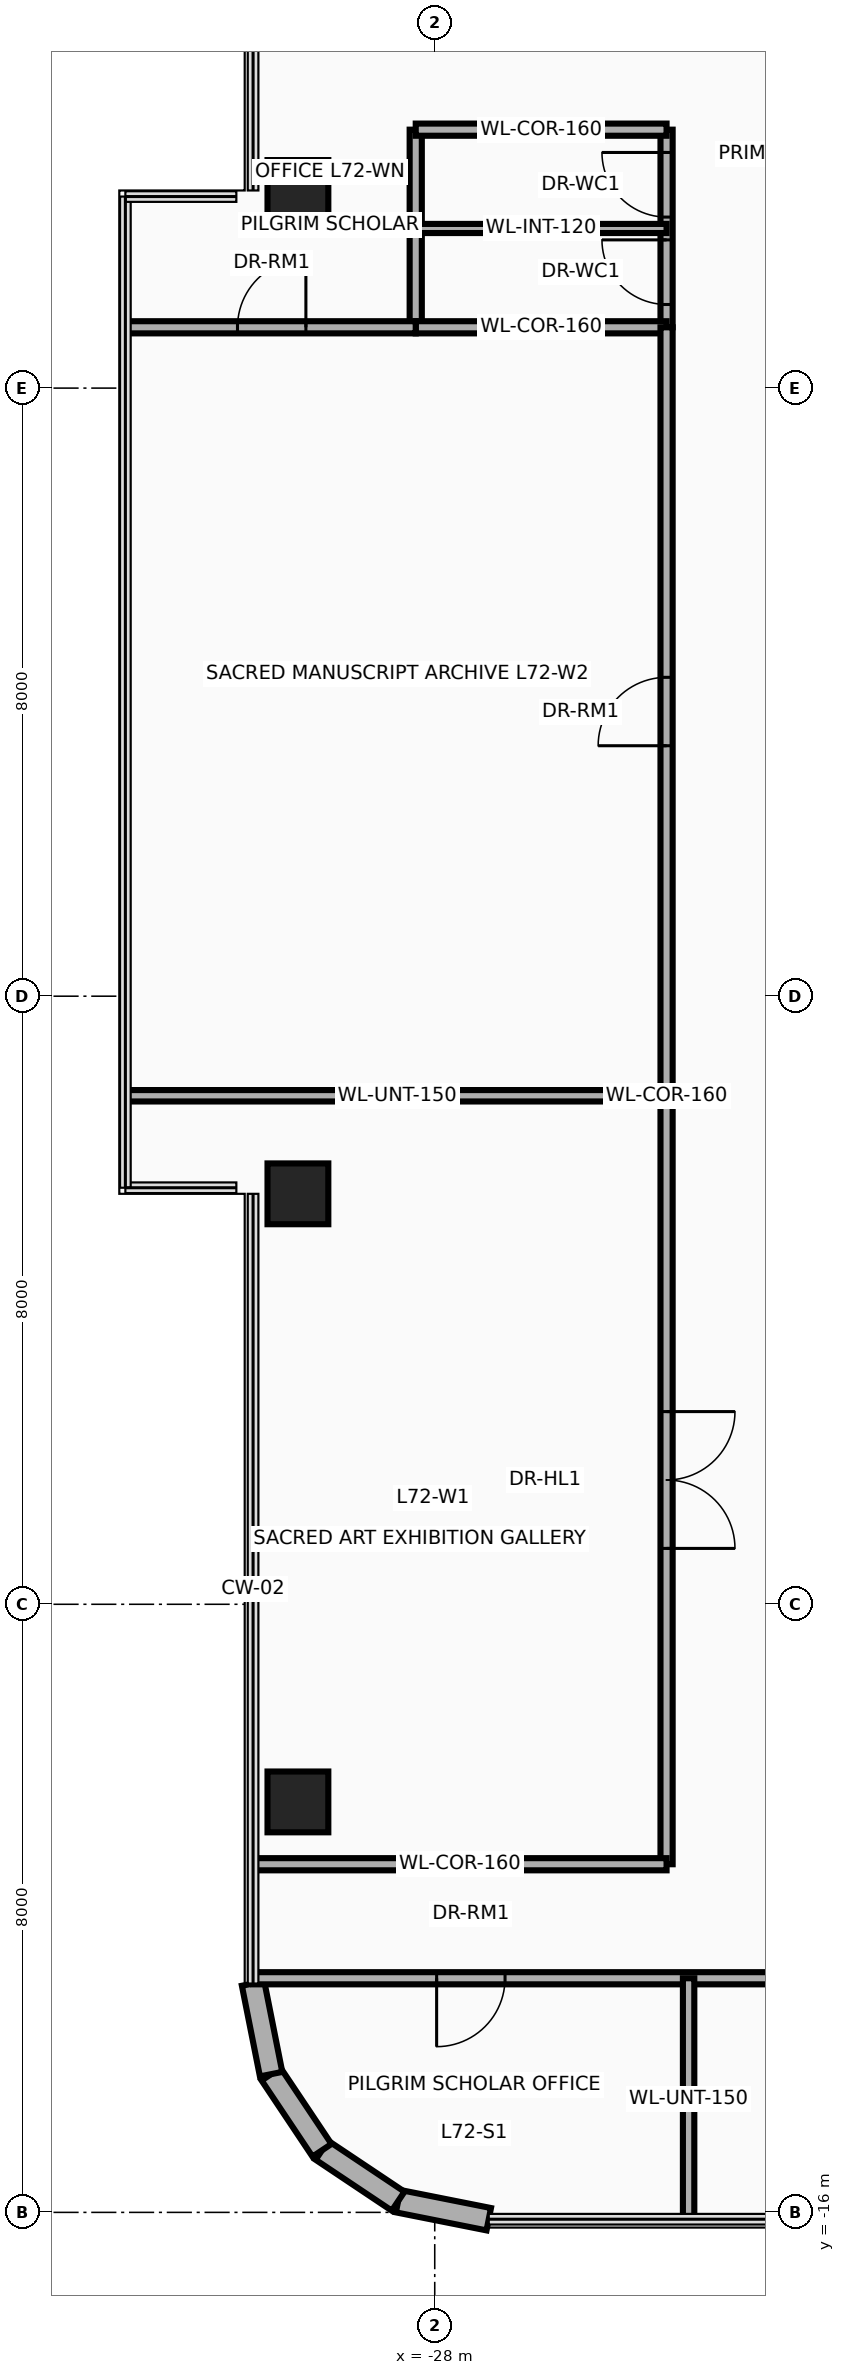
"""IFC4 building model, lengths in metres.
Left out: names, types, materials, properties, quantities, classifications, styles, units other than length and angle.
Written with IfcOpenShell. Run it as: python <this file> out.ifc"""

import sys

from ifc_helpers import new_model, si_unit, direction, frame, frame_2d, origin, origin_2d, place, context, subcontext, project, spatial, rectangle, extrude, source, transform, mapped, element, fill, save


model = new_model("IFC4")
c1 = context("Model", 3, precision=1e-05, world=origin(), true_north=direction((0.0, 1.0)))
c2 = subcontext(c1, "Body", "Model", "MODEL_VIEW")
j1 = project(units=[si_unit("LENGTHUNIT", "METRE"), si_unit("PLANEANGLEUNIT", "RADIAN")], contexts=[c1])
p1 = place(None, origin())
s1 = spatial("IfcSite", under=j1, at=p1, CompositionType="ELEMENT")
p2 = place(p1, origin())
s2 = spatial("IfcBuilding", under=s1, at=p2, CompositionType="ELEMENT")
p3 = place(p2, frame((0.0, 0.0, 276.5)))
s3 = spatial("IfcBuildingStorey", under=s2, at=p3, CompositionType="ELEMENT", Elevation=276.5)
m1 = source(origin(), c2, "Body", "SweptSolid", [
    extrude(rectangle(XDim=0.8, YDim=0.8, at=origin_2d()), origin(), (0.0, 0.0, 1.0), 3.5),
])
for number, where, z_axis, x_axis in (
    (1, (-29.8, -10.6, 0.0), (0.0, 0.0, 1.0), (1.0, 0.0, 0.0)),
    (2, (-29.8, -2.6, 0.0), (0.0, 0.0, 1.0), (1.0, 0.0, 0.0)),
    (3, (-29.8, 10.6, 0.0), (0.0, 0.0, 1.0), (1.0, 0.0, 0.0)),
):
    element("IfcColumn", number, at=place(p3, frame(where, z_axis=z_axis, x_axis=x_axis)), inside=s3, PredefinedType="COLUMN", context=c2, shape_type="MappedRepresentation", body=[
        mapped(m1, transform((0.0, 0.0, 0.0), x_axis=(1.0, 0.0, 0.0), y_axis=(0.0, 1.0, 0.0), z_axis=(0.0, 0.0, 1.0), scale=1.0)),
    ])
p4 = place(p3, frame((-27.289, -16.09, 0.0), z_axis=(0.0, 0.0, 1.0), x_axis=(-0.980765602568, 0.195189223115, 0.0)))
e4 = element("IfcWall", 4, at=p4, inside=s3, PredefinedType="SOLIDWALL", context=c2, shape_type="SweptSolid", body=[
    extrude(rectangle(XDim=1.216, YDim=0.3, at=frame_2d((0.608, 0.0))), origin(), (0.0, 0.0, 1.0), 3.26),
])
for number, where, z_axis, x_axis in (
    (5, (-28.482, -15.853, 0.0), (0.0, 0.0, 1.0), (-0.831, 0.556, 0.0)),
    (6, (-29.483, -15.183, 0.0), (0.0, 0.0, 1.0), (-0.556, 0.831, 0.0)),
):
    element("IfcWall", number, at=place(p3, frame(where, z_axis=z_axis, x_axis=x_axis)), inside=s3, PredefinedType="SOLIDWALL", context=c2, shape_type="SweptSolid", body=[
        extrude(rectangle(XDim=1.205, YDim=0.3, at=frame_2d((0.603, 0.0))), origin(), (0.0, 0.0, 1.0), 3.26),
    ])
p5 = place(p3, frame((-30.153, -14.182, 0.0), z_axis=(0.0, 0.0, 1.0), x_axis=(-0.194996050505, 0.980804027463, 0.0)))
e7 = element("IfcWall", 7, at=p5, inside=s3, PredefinedType="SOLIDWALL", context=c2, shape_type="SweptSolid", body=[
    extrude(rectangle(XDim=1.216, YDim=0.3, at=frame_2d((0.608, 0.0))), origin(), (0.0, 0.0, 1.0), 3.26),
])
p6 = place(p3, frame((-28.25, 8.8, 0.0), z_axis=(0.0, 0.0, 1.0), x_axis=(0.0, 1.0, 0.0)))
e8 = element("IfcWall", 8, at=p6, inside=s3, PredefinedType="PARTITIONING", context=c2, shape_type="SweptSolid", body=[
    extrude(rectangle(XDim=2.6, YDim=0.16, at=frame_2d((1.3, 0.0))), origin(), (0.0, 0.0, 1.0), 2.623),
])
p7 = place(p3, frame((-24.95, 8.8, 0.0), z_axis=(0.0, 0.0, 1.0), x_axis=(0.0, 1.0, 0.0)))
e9 = element("IfcWall", 9, at=p7, inside=s3, PredefinedType="PARTITIONING", context=c2, shape_type="SweptSolid", body=[
    extrude(rectangle(XDim=2.6, YDim=0.16, at=frame_2d((1.3, 0.0))), origin(), (0.0, 0.0, 1.0), 2.623),
])
p8 = place(p7, frame((0.3, 0.0, 0.0)))
e10 = element("IfcOpeningElement", 10, at=p8, cuts=e9, PredefinedType="OPENING", context=c2, shape_type="SweptSolid", body=[
    extrude(rectangle(XDim=0.85, YDim=2.1, at=frame_2d((0.425, 1.05))), frame((0.0, 0.095, 0.0), z_axis=(0.0, -1.0, 0.0), x_axis=(1.0, 0.0, 0.0)), (0.0, 0.0, 1.0), 0.19),
])
p9 = place(p7, frame((1.45, 0.0, 0.0)))
e11 = element("IfcOpeningElement", 11, at=p9, cuts=e9, PredefinedType="OPENING", context=c2, shape_type="SweptSolid", body=[
    extrude(rectangle(XDim=0.85, YDim=2.1, at=frame_2d((0.425, 1.05))), frame((0.0, 0.095, 0.0), z_axis=(0.0, -1.0, 0.0), x_axis=(1.0, 0.0, 0.0)), (0.0, 0.0, 1.0), 0.19),
])
for number, where, z_axis, x_axis in (
    (12, (-28.25, 8.8, 0.0), (0.0, 0.0, 1.0), (1.0, 0.0, 0.0)),
    (13, (-28.25, 11.4, 0.0), (0.0, 0.0, 1.0), (1.0, 0.0, 0.0)),
):
    element("IfcWall", number, at=place(p3, frame(where, z_axis=z_axis, x_axis=x_axis)), inside=s3, PredefinedType="PARTITIONING", context=c2, shape_type="SweptSolid", body=[
        extrude(rectangle(XDim=3.3, YDim=0.16, at=frame_2d((1.65, 0.0))), origin(), (0.0, 0.0, 1.0), 3.26),
    ])
p10 = place(p3, frame((-28.25, 10.1, 0.0), z_axis=(0.0, 0.0, 1.0), x_axis=(1.0, 0.0, 0.0)))
e14 = element("IfcWall", 14, at=p10, inside=s3, PredefinedType="PARTITIONING", context=c2, shape_type="SweptSolid", body=[
    extrude(rectangle(XDim=3.3, YDim=0.12, at=frame_2d((1.65, 0.0))), origin(), (0.0, 0.0, 1.0), 3.26),
])
p11 = place(p3, frame((-24.95, -11.42, 0.0), z_axis=(0.0, 0.0, 1.0), x_axis=(0.0, 1.0, 0.0)))
e15 = element("IfcWall", 15, at=p11, inside=s3, PredefinedType="PARTITIONING", context=c2, shape_type="SweptSolid", body=[
    extrude(rectangle(XDim=20.22, YDim=0.16, at=frame_2d((10.11, 0.0))), origin(), (0.0, 0.0, 1.0), 2.623),
])
p12 = place(p11, frame((4.155, 0.0, 0.0)))
e16 = element("IfcOpeningElement", 16, at=p12, cuts=e15, PredefinedType="OPENING", context=c2, shape_type="SweptSolid", body=[
    extrude(rectangle(XDim=1.8, YDim=2.15, at=frame_2d((0.9, 1.075))), frame((0.0, 0.095, 0.0), z_axis=(0.0, -1.0, 0.0), x_axis=(1.0, 0.0, 0.0)), (0.0, 0.0, 1.0), 0.19),
])
p13 = place(p11, frame((14.715, 0.0, 0.0)))
e17 = element("IfcOpeningElement", 17, at=p13, cuts=e15, PredefinedType="OPENING", context=c2, shape_type="SweptSolid", body=[
    extrude(rectangle(XDim=0.9, YDim=2.1, at=frame_2d((0.45, 1.05))), frame((0.0, 0.095, 0.0), z_axis=(0.0, -1.0, 0.0), x_axis=(1.0, 0.0, 0.0)), (0.0, 0.0, 1.0), 0.19),
])
p14 = place(p3, frame((-32.04, 8.8, 0.0), z_axis=(0.0, 0.0, 1.0), x_axis=(1.0, 0.0, 0.0)))
e18 = element("IfcWall", 18, at=p14, inside=s3, PredefinedType="PARTITIONING", context=c2, shape_type="SweptSolid", body=[
    extrude(rectangle(XDim=3.79, YDim=0.16, at=frame_2d((1.895, 0.0))), origin(), (0.0, 0.0, 1.0), 2.706),
])
p15 = place(p14, frame((1.445, 0.0, 0.0)))
e19 = element("IfcOpeningElement", 19, at=p15, cuts=e18, PredefinedType="OPENING", context=c2, shape_type="SweptSolid", body=[
    extrude(rectangle(XDim=0.9, YDim=2.1, at=frame_2d((0.45, 1.05))), frame((0.0, 0.095, 0.0), z_axis=(0.0, -1.0, 0.0), x_axis=(1.0, 0.0, 0.0)), (0.0, 0.0, 1.0), 0.19),
])
p16 = place(p3, frame((-32.04, -1.31, 0.0), z_axis=(0.0, 0.0, 1.0), x_axis=(1.0, 0.0, 0.0)))
e20 = element("IfcWall", 20, at=p16, inside=s3, PredefinedType="PARTITIONING", context=c2, shape_type="SweptSolid", body=[
    extrude(rectangle(XDim=7.09, YDim=0.15, at=frame_2d((3.545, 0.0))), origin(), (0.0, 0.0, 1.0), 2.706),
])
p17 = place(p3, frame((-30.39, -12.92, 0.0), z_axis=(0.0, 0.0, 1.0), x_axis=(1.0, 0.0, 0.0)))
e21 = element("IfcWall", 21, at=p17, inside=s3, PredefinedType="PARTITIONING", context=c2, shape_type="SweptSolid", body=[
    extrude(rectangle(XDim=20.78, YDim=0.16, at=frame_2d((10.39, 0.0))), origin(), (0.0, 0.0, 1.0), 2.634),
])
p18 = place(p17, frame((2.415, 0.0, 0.0)))
e22 = element("IfcOpeningElement", 22, at=p18, cuts=e21, PredefinedType="OPENING", context=c2, shape_type="SweptSolid", body=[
    extrude(rectangle(XDim=0.9, YDim=2.1, at=frame_2d((0.45, 1.05))), frame((0.0, 0.095, 0.0), z_axis=(0.0, -1.0, 0.0), x_axis=(1.0, 0.0, 0.0)), (0.0, 0.0, 1.0), 0.19),
])
p19 = place(p17, frame((9.07, 0.0, 0.0)))
e23 = element("IfcOpeningElement", 23, at=p19, cuts=e21, PredefinedType="OPENING", context=c2, shape_type="SweptSolid", body=[
    extrude(rectangle(XDim=0.9, YDim=2.1, at=frame_2d((0.45, 1.05))), frame((0.0, 0.095, 0.0), z_axis=(0.0, -1.0, 0.0), x_axis=(1.0, 0.0, 0.0)), (0.0, 0.0, 1.0), 0.19),
])
p20 = place(p17, frame((16.595, 0.0, 0.0)))
e24 = element("IfcOpeningElement", 24, at=p20, cuts=e21, PredefinedType="OPENING", context=c2, shape_type="SweptSolid", body=[
    extrude(rectangle(XDim=0.9, YDim=2.1, at=frame_2d((0.45, 1.05))), frame((0.0, 0.095, 0.0), z_axis=(0.0, -1.0, 0.0), x_axis=(1.0, 0.0, 0.0)), (0.0, 0.0, 1.0), 0.19),
])
p21 = place(p3, frame((-24.66, -16.09, 0.0), z_axis=(0.0, 0.0, 1.0), x_axis=(0.0, 1.0, 0.0)))
e25 = element("IfcWall", 25, at=p21, inside=s3, PredefinedType="PARTITIONING", context=c2, shape_type="SweptSolid", body=[
    extrude(rectangle(XDim=3.17, YDim=0.15, at=frame_2d((1.585, 0.0))), origin(), (0.0, 0.0, 1.0), 3.26),
])
p22 = place(p3, frame((-30.39, -11.42, 0.0), z_axis=(0.0, 0.0, 1.0), x_axis=(1.0, 0.0, 0.0)))
e26 = element("IfcWall", 26, at=p22, inside=s3, PredefinedType="PARTITIONING", context=c2, shape_type="SweptSolid", body=[
    extrude(rectangle(XDim=5.44, YDim=0.16, at=frame_2d((2.72, 0.0))), origin(), (0.0, 0.0, 1.0), 3.26),
])
p23 = place(p8, origin())
e27 = element("IfcDoor", 27, at=p23, inside=s3, OperationType="SINGLE_SWING_RIGHT", PredefinedType="DOOR", context=c2, shape_type="SweptSolid", body=[
    extrude(rectangle(XDim=0.85, YDim=2.1, at=frame_2d((0.425, 1.05))), frame((0.0, 0.025, 0.0), z_axis=(0.0, -1.0, 0.0), x_axis=(1.0, 0.0, 0.0)), (0.0, 0.0, 1.0), 0.05),
])
fill(e10, e27)
p24 = place(p9, origin())
e28 = element("IfcDoor", 28, at=p24, inside=s3, OperationType="SINGLE_SWING_LEFT", PredefinedType="DOOR", context=c2, shape_type="SweptSolid", body=[
    extrude(rectangle(XDim=0.85, YDim=2.1, at=frame_2d((0.425, 1.05))), frame((0.0, 0.025, 0.0), z_axis=(0.0, -1.0, 0.0), x_axis=(1.0, 0.0, 0.0)), (0.0, 0.0, 1.0), 0.05),
])
fill(e11, e28)
p25 = place(p15, origin())
e29 = element("IfcDoor", 29, at=p25, inside=s3, OperationType="SINGLE_SWING_RIGHT", PredefinedType="DOOR", context=c2, shape_type="SweptSolid", body=[
    extrude(rectangle(XDim=0.9, YDim=2.1, at=frame_2d((0.45, 1.05))), frame((0.0, 0.025, 0.0), z_axis=(0.0, -1.0, 0.0), x_axis=(1.0, 0.0, 0.0)), (0.0, 0.0, 1.0), 0.05),
])
fill(e19, e29)
p26 = place(p12, frame((1.8, 0.0, 0.0), z_axis=(0.0, 0.0, 1.0), x_axis=(-1.0, 0.0, 0.0)))
e30 = element("IfcDoor", 30, at=p26, inside=s3, OperationType="DOUBLE_DOOR_SINGLE_SWING", PredefinedType="DOOR", context=c2, shape_type="SweptSolid", body=[
    extrude(rectangle(XDim=1.8, YDim=2.15, at=frame_2d((0.9, 1.075))), frame((0.0, 0.025, 0.0), z_axis=(0.0, -1.0, 0.0), x_axis=(1.0, 0.0, 0.0)), (0.0, 0.0, 1.0), 0.05),
])
fill(e16, e30)
p27 = place(p13, origin())
e31 = element("IfcDoor", 31, at=p27, inside=s3, OperationType="SINGLE_SWING_RIGHT", PredefinedType="DOOR", context=c2, shape_type="SweptSolid", body=[
    extrude(rectangle(XDim=0.9, YDim=2.1, at=frame_2d((0.45, 1.05))), frame((0.0, 0.025, 0.0), z_axis=(0.0, -1.0, 0.0), x_axis=(1.0, 0.0, 0.0)), (0.0, 0.0, 1.0), 0.05),
])
fill(e17, e31)
p28 = place(p18, frame((0.9, 0.0, 0.0), z_axis=(0.0, 0.0, 1.0), x_axis=(-1.0, 0.0, 0.0)))
e32 = element("IfcDoor", 32, at=p28, inside=s3, OperationType="SINGLE_SWING_LEFT", PredefinedType="DOOR", context=c2, shape_type="SweptSolid", body=[
    extrude(rectangle(XDim=0.9, YDim=2.1, at=frame_2d((0.45, 1.05))), frame((0.0, 0.025, 0.0), z_axis=(0.0, -1.0, 0.0), x_axis=(1.0, 0.0, 0.0)), (0.0, 0.0, 1.0), 0.05),
])
fill(e22, e32)
save(model, sys.argv[1])
